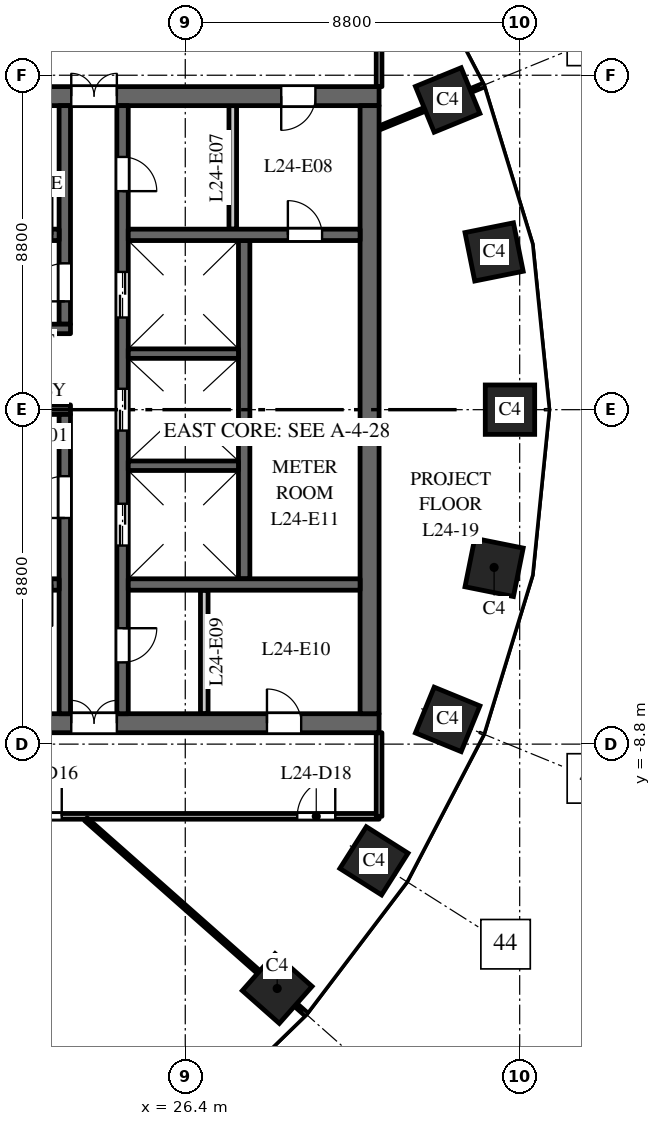
"""IFC4 building model, lengths in metres.
Left out: names, types, materials, properties, quantities, classifications, styles, units other than length and angle.
Written with IfcOpenShell. Run it as: python <this file> out.ifc"""

import sys

from ifc_helpers import new_model, si_unit, direction, frame, frame_2d, origin, origin_2d, place, context, subcontext, project, spatial, rectangle, extrude, element, fill, save


model = new_model("IFC4")
c1 = context("Model", 3, precision=1e-05, world=origin(), true_north=direction((0.0, 1.0)))
c2 = subcontext(c1, "Body", "Model", "MODEL_VIEW")
j1 = project(units=[si_unit("LENGTHUNIT", "METRE"), si_unit("PLANEANGLEUNIT", "RADIAN")], contexts=[c1])
p1 = place(None, origin())
s1 = spatial("IfcSite", under=j1, at=p1, CompositionType="ELEMENT")
p2 = place(p1, origin())
s2 = spatial("IfcBuilding", under=s1, at=p2, CompositionType="ELEMENT")
p3 = place(p2, frame((0.0, 0.0, 108.0)))
s3 = spatial("IfcBuildingStorey", under=s2, at=p3, CompositionType="ELEMENT", Elevation=108.0)
for number, where, z_axis, x_axis in (
    (1, (34.945, 0.0, 0.0), (0.0, 0.0, 1.0), (0.0, 1.0, 0.0)),
    (2, (34.527, 4.151, 0.0), (0.0, 0.0, 1.0), (-0.197, 0.98, 0.0)),
    (3, (33.305, 8.149, 0.0), (0.0, 0.0, 1.0), (-0.379, 0.925, 0.0)),
    (4, (28.819, -15.23, 0.0), (0.0, 0.0, 1.0), (0.663, 0.749, 0.0)),
    (5, (31.365, -11.871, 0.0), (0.0, 0.0, 1.0), (0.535, 0.845, 0.0)),
    (6, (33.305, -8.149, 0.0), (0.0, 0.0, 1.0), (0.379, 0.925, 0.0)),
    (7, (34.527, -4.151, 0.0), (0.0, 0.0, 1.0), (0.197, 0.98, 0.0)),
):
    element("IfcColumn", number, at=place(p3, frame(where, z_axis=z_axis, x_axis=x_axis)), inside=s3, PredefinedType="COLUMN", context=c2, shape_type="SweptSolid", body=[
        extrude(rectangle(XDim=1.3, YDim=1.3, at=origin_2d()), origin(), (0.0, 0.0, 1.0), 4.0),
    ])
p4 = place(p3, frame((16.5, 8.25, 0.0), z_axis=(0.0, 0.0, 1.0), x_axis=(1.0, 0.0, 0.0)))
e8 = element("IfcWall", 8, at=p4, inside=s3, PredefinedType="SHEAR", context=c2, shape_type="SweptSolid", body=[
    extrude(rectangle(XDim=15.0, YDim=0.5, at=frame_2d((7.5, 0.0))), origin(), (0.0, 0.0, 1.0), 3.7),
])
p5 = place(p4, frame((6.9, 0.0, 0.0)))
e9 = element("IfcOpeningElement", 9, at=p5, cuts=e8, PredefinedType="OPENING", context=c2, shape_type="SweptSolid", body=[
    extrude(rectangle(XDim=1.2, YDim=2.1, at=frame_2d((0.6, 1.05))), frame((0.0, 0.26, 0.0), z_axis=(0.0, -1.0, 0.0), x_axis=(1.0, 0.0, 0.0)), (0.0, 0.0, 1.0), 0.52),
])
p6 = place(p4, frame((12.425, 0.0, 0.0)))
e10 = element("IfcOpeningElement", 10, at=p6, cuts=e8, PredefinedType="OPENING", context=c2, shape_type="SweptSolid", body=[
    extrude(rectangle(XDim=0.9, YDim=2.1, at=frame_2d((0.45, 1.05))), frame((0.0, 0.26, 0.0), z_axis=(0.0, -1.0, 0.0), x_axis=(1.0, 0.0, 0.0)), (0.0, 0.0, 1.0), 0.52),
])
p7 = place(p3, frame((16.5, -8.25, 0.0), z_axis=(0.0, 0.0, 1.0), x_axis=(1.0, 0.0, 0.0)))
e11 = element("IfcWall", 11, at=p7, inside=s3, PredefinedType="SHEAR", context=c2, shape_type="SweptSolid", body=[
    extrude(rectangle(XDim=15.0, YDim=0.5, at=frame_2d((7.5, 0.0))), origin(), (0.0, 0.0, 1.0), 3.7),
])
p8 = place(p7, frame((6.9, 0.0, 0.0)))
e12 = element("IfcOpeningElement", 12, at=p8, cuts=e11, PredefinedType="OPENING", context=c2, shape_type="SweptSolid", body=[
    extrude(rectangle(XDim=1.2, YDim=2.1, at=frame_2d((0.6, 1.05))), frame((0.0, 0.26, 0.0), z_axis=(0.0, -1.0, 0.0), x_axis=(1.0, 0.0, 0.0)), (0.0, 0.0, 1.0), 0.52),
])
p9 = place(p7, frame((12.05, 0.0, 0.0)))
e13 = element("IfcOpeningElement", 13, at=p9, cuts=e11, PredefinedType="OPENING", context=c2, shape_type="SweptSolid", body=[
    extrude(rectangle(XDim=0.9, YDim=2.1, at=frame_2d((0.45, 1.05))), frame((0.0, 0.26, 0.0), z_axis=(0.0, -1.0, 0.0), x_axis=(1.0, 0.0, 0.0)), (0.0, 0.0, 1.0), 0.52),
])
p10 = place(p3, frame((27.95, -4.45, 0.0), z_axis=(0.0, 0.0, 1.0), x_axis=(0.0, 1.0, 0.0)))
e14 = element("IfcWall", 14, at=p10, inside=s3, PredefinedType="SHEAR", context=c2, shape_type="SweptSolid", body=[
    extrude(rectangle(XDim=8.9, YDim=0.3, at=frame_2d((4.45, 0.0))), origin(), (0.0, 0.0, 1.0), 3.7),
])
p11 = place(p3, frame((24.75, -8.0, 0.0), z_axis=(0.0, 0.0, 1.0), x_axis=(0.0, 1.0, 0.0)))
e15 = element("IfcWall", 15, at=p11, inside=s3, PredefinedType="SHEAR", context=c2, shape_type="SweptSolid", body=[
    extrude(rectangle(XDim=16.0, YDim=0.3, at=frame_2d((8.0, 0.0))), origin(), (0.0, 0.0, 1.0), 3.7),
])
p12 = place(p11, frame((4.425, 0.0, 0.0)))
e16 = element("IfcOpeningElement", 16, at=p12, cuts=e15, PredefinedType="OPENING", context=c2, shape_type="SweptSolid", body=[
    extrude(rectangle(XDim=1.1, YDim=2.1, at=frame_2d((0.55, 1.05))), frame((0.0, 0.16, 0.0), z_axis=(0.0, -1.0, 0.0), x_axis=(1.0, 0.0, 0.0)), (0.0, 0.0, 1.0), 0.32),
])
p13 = place(p11, frame((7.45, 0.0, 0.0)))
e17 = element("IfcOpeningElement", 17, at=p13, cuts=e15, PredefinedType="OPENING", context=c2, shape_type="SweptSolid", body=[
    extrude(rectangle(XDim=1.1, YDim=2.1, at=frame_2d((0.55, 1.05))), frame((0.0, 0.16, 0.0), z_axis=(0.0, -1.0, 0.0), x_axis=(1.0, 0.0, 0.0)), (0.0, 0.0, 1.0), 0.32),
])
p14 = place(p11, frame((10.425, 0.0, 0.0)))
e18 = element("IfcOpeningElement", 18, at=p14, cuts=e15, PredefinedType="OPENING", context=c2, shape_type="SweptSolid", body=[
    extrude(rectangle(XDim=1.2, YDim=2.1, at=frame_2d((0.6, 1.05))), frame((0.0, 0.16, 0.0), z_axis=(0.0, -1.0, 0.0), x_axis=(1.0, 0.0, 0.0)), (0.0, 0.0, 1.0), 0.32),
])
p15 = place(p11, frame((13.75, 0.0, 0.0)))
e19 = element("IfcOpeningElement", 19, at=p15, cuts=e15, PredefinedType="OPENING", context=c2, shape_type="SweptSolid", body=[
    extrude(rectangle(XDim=0.9, YDim=2.1, at=frame_2d((0.45, 1.05))), frame((0.0, 0.16, 0.0), z_axis=(0.0, -1.0, 0.0), x_axis=(1.0, 0.0, 0.0)), (0.0, 0.0, 1.0), 0.32),
])
p16 = place(p11, frame((1.35, 0.0, 0.0)))
e20 = element("IfcOpeningElement", 20, at=p16, cuts=e15, PredefinedType="OPENING", context=c2, shape_type="SweptSolid", body=[
    extrude(rectangle(XDim=0.9, YDim=2.1, at=frame_2d((0.45, 1.05))), frame((0.0, 0.16, 0.0), z_axis=(0.0, -1.0, 0.0), x_axis=(1.0, 0.0, 0.0)), (0.0, 0.0, 1.0), 0.32),
])
p17 = place(p3, frame((20.1, 0.0, 0.0), z_axis=(0.0, 0.0, 1.0), x_axis=(1.0, 0.0, 0.0)))
e21 = element("IfcWall", 21, at=p17, inside=s3, PredefinedType="SHEAR", context=c2, shape_type="SweptSolid", body=[
    extrude(rectangle(XDim=3.28, YDim=0.25, at=frame_2d((1.64, 0.0))), origin(), (0.0, 0.0, 1.0), 3.7),
])
p18 = place(p3, frame((31.25, -8.0, 0.0), z_axis=(0.0, 0.0, 1.0), x_axis=(0.0, 1.0, 0.0)))
e22 = element("IfcWall", 22, at=p18, inside=s3, PredefinedType="SHEAR", context=c2, shape_type="SweptSolid", body=[
    extrude(rectangle(XDim=16.0, YDim=0.5, at=frame_2d((8.0, 0.0))), origin(), (0.0, 0.0, 1.0), 3.7),
])
p19 = place(p3, frame((24.9, 4.6, 0.0), z_axis=(0.0, 0.0, 1.0), x_axis=(1.0, 0.0, 0.0)))
e23 = element("IfcWall", 23, at=p19, inside=s3, PredefinedType="SHEAR", context=c2, shape_type="SweptSolid", body=[
    extrude(rectangle(XDim=6.1, YDim=0.3, at=frame_2d((3.05, 0.0))), origin(), (0.0, 0.0, 1.0), 3.7),
])
p20 = place(p19, frame((4.2, 0.0, 0.0)))
e24 = element("IfcOpeningElement", 24, at=p20, cuts=e23, PredefinedType="OPENING", context=c2, shape_type="SweptSolid", body=[
    extrude(rectangle(XDim=0.9, YDim=2.1, at=frame_2d((0.45, 1.05))), frame((0.0, 0.16, 0.0), z_axis=(0.0, -1.0, 0.0), x_axis=(1.0, 0.0, 0.0)), (0.0, 0.0, 1.0), 0.32),
])
for number, where, z_axis, x_axis in (
    (25, (27.65, 4.75, 0.0), (0.0, 0.0, 1.0), (0.0, 1.0, 0.0)),
    (26, (26.9, -8.0, 0.0), (0.0, 0.0, 1.0), (0.0, 1.0, 0.0)),
):
    element("IfcWall", number, at=place(p3, frame(where, z_axis=z_axis, x_axis=x_axis)), inside=s3, PredefinedType="PARTITIONING", context=c2, shape_type="SweptSolid", body=[
        extrude(rectangle(XDim=3.25, YDim=0.2, at=frame_2d((1.625, 0.0))), origin(), (0.0, 0.0, 1.0), 3.7),
    ])
p21 = place(p3, frame((24.9, -4.6, 0.0), z_axis=(0.0, 0.0, 1.0), x_axis=(1.0, 0.0, 0.0)))
e27 = element("IfcWall", 27, at=p21, inside=s3, PredefinedType="SHEAR", context=c2, shape_type="SweptSolid", body=[
    extrude(rectangle(XDim=6.1, YDim=0.3, at=frame_2d((3.05, 0.0))), origin(), (0.0, 0.0, 1.0), 3.7),
])
for number, where, z_axis, x_axis in (
    (28, (24.9, -1.475, 0.0), (0.0, 0.0, 1.0), (1.0, 0.0, 0.0)),
    (29, (24.9, 1.475, 0.0), (0.0, 0.0, 1.0), (1.0, 0.0, 0.0)),
):
    element("IfcWall", number, at=place(p3, frame(where, z_axis=z_axis, x_axis=x_axis)), inside=s3, PredefinedType="SHEAR", context=c2, shape_type="SweptSolid", body=[
        extrude(rectangle(XDim=2.9, YDim=0.25, at=frame_2d((1.45, 0.0))), origin(), (0.0, 0.0, 1.0), 3.7),
    ])
p22 = place(p3, frame((23.23, 2.25, 0.0), z_axis=(0.0, 0.0, 1.0), x_axis=(0.0, 1.0, 0.0)))
e30 = element("IfcWall", 30, at=p22, inside=s3, PredefinedType="SHEAR", context=c2, shape_type="SweptSolid", body=[
    extrude(rectangle(XDim=5.75, YDim=0.3, at=frame_2d((2.875, 0.0))), origin(), (0.0, 0.0, 1.0), 3.7),
])
p23 = place(p22, frame((0.6, 0.0, 0.0)))
e31 = element("IfcOpeningElement", 31, at=p23, cuts=e30, PredefinedType="OPENING", context=c2, shape_type="SweptSolid", body=[
    extrude(rectangle(XDim=1.0, YDim=2.1, at=frame_2d((0.5, 1.05))), frame((0.0, 0.16, 0.0), z_axis=(0.0, -1.0, 0.0), x_axis=(1.0, 0.0, 0.0)), (0.0, 0.0, 1.0), 0.32),
])
p24 = place(p3, frame((23.23, -8.0, 0.0), z_axis=(0.0, 0.0, 1.0), x_axis=(0.0, 1.0, 0.0)))
e32 = element("IfcWall", 32, at=p24, inside=s3, PredefinedType="SHEAR", context=c2, shape_type="SweptSolid", body=[
    extrude(rectangle(XDim=7.875, YDim=0.3, at=frame_2d((3.938, 0.0))), origin(), (0.0, 0.0, 1.0), 3.7),
])
p25 = place(p24, frame((5.15, 0.0, 0.0)))
e33 = element("IfcOpeningElement", 33, at=p25, cuts=e32, PredefinedType="OPENING", context=c2, shape_type="SweptSolid", body=[
    extrude(rectangle(XDim=1.1, YDim=2.1, at=frame_2d((0.55, 1.05))), frame((0.0, 0.16, 0.0), z_axis=(0.0, -1.0, 0.0), x_axis=(1.0, 0.0, 0.0)), (0.0, 0.0, 1.0), 0.32),
])
p26 = place(p3, frame((16.9, 4.6, 0.0), z_axis=(0.0, 0.0, 1.0), x_axis=(1.0, 0.0, 0.0)))
e34 = element("IfcWall", 34, at=p26, inside=s3, PredefinedType="SHEAR", context=c2, shape_type="SweptSolid", body=[
    extrude(rectangle(XDim=6.18, YDim=0.3, at=frame_2d((3.09, 0.0))), origin(), (0.0, 0.0, 1.0), 3.7),
])
p27 = place(p26, frame((4.9, 0.0, 0.0)))
e35 = element("IfcOpeningElement", 35, at=p27, cuts=e34, PredefinedType="OPENING", context=c2, shape_type="SweptSolid", body=[
    extrude(rectangle(XDim=1.1, YDim=2.1, at=frame_2d((0.55, 1.05))), frame((0.0, 0.16, 0.0), z_axis=(0.0, -1.0, 0.0), x_axis=(1.0, 0.0, 0.0)), (0.0, 0.0, 1.0), 0.32),
])
p28 = place(p3, frame((16.9, -4.6, 0.0), z_axis=(0.0, 0.0, 1.0), x_axis=(1.0, 0.0, 0.0)))
e36 = element("IfcWall", 36, at=p28, inside=s3, PredefinedType="SHEAR", context=c2, shape_type="SweptSolid", body=[
    extrude(rectangle(XDim=6.18, YDim=0.3, at=frame_2d((3.09, 0.0))), origin(), (0.0, 0.0, 1.0), 3.7),
])
p29 = place(p28, frame((4.9, 0.0, 0.0)))
e37 = element("IfcOpeningElement", 37, at=p29, cuts=e36, PredefinedType="OPENING", context=c2, shape_type="SweptSolid", body=[
    extrude(rectangle(XDim=1.1, YDim=2.1, at=frame_2d((0.55, 1.05))), frame((0.0, 0.16, 0.0), z_axis=(0.0, -1.0, 0.0), x_axis=(1.0, 0.0, 0.0)), (0.0, 0.0, 1.0), 0.32),
])
p30 = place(p3, frame((20.85, 2.125, 0.0), z_axis=(0.0, 0.0, 1.0), x_axis=(1.0, 0.0, 0.0)))
e38 = element("IfcWall", 38, at=p30, inside=s3, PredefinedType="SHEAR", context=c2, shape_type="SweptSolid", body=[
    extrude(rectangle(XDim=2.53, YDim=0.25, at=frame_2d((1.265, 0.0))), origin(), (0.0, 0.0, 1.0), 3.7),
])
p31 = place(p3, frame((16.5, -10.7, 0.0), z_axis=(0.0, 0.0, 1.0), x_axis=(1.0, 0.0, 0.0)))
e39 = element("IfcWall", 39, at=p31, inside=s3, PredefinedType="PARTITIONING", context=c2, shape_type="SweptSolid", body=[
    extrude(rectangle(XDim=15.0, YDim=0.15, at=frame_2d((7.5, 0.0))), origin(), (0.0, 0.0, 1.0), 2.75),
])
p32 = place(p31, frame((5.65, 0.0, 0.0)))
e40 = element("IfcOpeningElement", 40, at=p32, cuts=e39, PredefinedType="OPENING", context=c2, shape_type="SweptSolid", body=[
    extrude(rectangle(XDim=1.0, YDim=2.1, at=frame_2d((0.5, 1.05))), frame((0.0, 0.085, 0.0), z_axis=(0.0, -1.0, 0.0), x_axis=(1.0, 0.0, 0.0)), (0.0, 0.0, 1.0), 0.17),
])
p33 = place(p31, frame((12.847, 0.0, 0.0)))
e41 = element("IfcOpeningElement", 41, at=p33, cuts=e39, PredefinedType="OPENING", context=c2, shape_type="SweptSolid", body=[
    extrude(rectangle(XDim=1.0, YDim=2.1, at=frame_2d((0.5, 1.05))), frame((0.0, 0.085, 0.0), z_axis=(0.0, -1.0, 0.0), x_axis=(1.0, 0.0, 0.0)), (0.0, 0.0, 1.0), 0.17),
])
p34 = place(p3, frame((23.785, -10.778, 0.0), z_axis=(0.0, 0.0, 1.0), x_axis=(0.748985701008, -0.662586160198, 0.0)))
e42 = element("IfcWall", 42, at=p34, inside=s3, PredefinedType="PARTITIONING", context=c2, shape_type="SweptSolid", body=[
    extrude(rectangle(XDim=7.723, YDim=0.1, at=frame_2d((3.861, 0.0))), origin(), (0.0, 0.0, 1.0), 3.7),
])
p35 = place(p3, frame((31.5, -10.7, 0.0), z_axis=(0.0, 0.0, 1.0), x_axis=(0.0, 1.0, 0.0)))
e43 = element("IfcWall", 43, at=p35, inside=s3, PredefinedType="PARTITIONING", context=c2, shape_type="SweptSolid", body=[
    extrude(rectangle(XDim=2.2, YDim=0.15, at=frame_2d((1.1, 0.0))), origin(), (0.0, 0.0, 1.0), 2.9),
])
p36 = place(p3, frame((31.5, 7.41, 0.0), z_axis=(0.0, 0.0, 1.0), x_axis=(0.925344112436, 0.379128307542, 0.0)))
e44 = element("IfcWall", 44, at=p36, inside=s3, PredefinedType="PARTITIONING", context=c2, shape_type="SweptSolid", body=[
    extrude(rectangle(XDim=2.954, YDim=0.1, at=frame_2d((1.477, 0.0))), origin(), (0.0, 0.0, 1.0), 3.7),
])
p37 = place(p3, frame((31.5, 8.5, 0.0), z_axis=(0.0, 0.0, 1.0), x_axis=(0.0, 1.0, 0.0)))
e45 = element("IfcWall", 45, at=p37, inside=s3, PredefinedType="PARTITIONING", context=c2, shape_type="SweptSolid", body=[
    extrude(rectangle(XDim=2.2, YDim=0.15, at=frame_2d((1.1, 0.0))), origin(), (0.0, 0.0, 1.0), 2.9),
])
p38 = place(p12, origin())
e46 = element("IfcDoor", 46, at=p38, inside=s3, OperationType="DOUBLE_DOOR_SLIDING", PredefinedType="DOOR", context=c2, shape_type="SweptSolid", body=[
    extrude(rectangle(XDim=1.1, YDim=2.1, at=frame_2d((0.55, 1.05))), frame((0.0, 0.025, 0.0), z_axis=(0.0, -1.0, 0.0), x_axis=(1.0, 0.0, 0.0)), (0.0, 0.0, 1.0), 0.05),
])
fill(e16, e46)
p39 = place(p13, origin())
e47 = element("IfcDoor", 47, at=p39, inside=s3, OperationType="DOUBLE_DOOR_SLIDING", PredefinedType="DOOR", context=c2, shape_type="SweptSolid", body=[
    extrude(rectangle(XDim=1.1, YDim=2.1, at=frame_2d((0.55, 1.05))), frame((0.0, 0.025, 0.0), z_axis=(0.0, -1.0, 0.0), x_axis=(1.0, 0.0, 0.0)), (0.0, 0.0, 1.0), 0.05),
])
fill(e17, e47)
p40 = place(p14, origin())
e48 = element("IfcDoor", 48, at=p40, inside=s3, OperationType="DOUBLE_DOOR_SLIDING", PredefinedType="DOOR", context=c2, shape_type="SweptSolid", body=[
    extrude(rectangle(XDim=1.2, YDim=2.1, at=frame_2d((0.6, 1.05))), frame((0.0, 0.025, 0.0), z_axis=(0.0, -1.0, 0.0), x_axis=(1.0, 0.0, 0.0)), (0.0, 0.0, 1.0), 0.05),
])
fill(e18, e48)
p41 = place(p27, origin())
e49 = element("IfcDoor", 49, at=p41, inside=s3, OperationType="SINGLE_SWING_LEFT", PredefinedType="DOOR", context=c2, shape_type="SweptSolid", body=[
    extrude(rectangle(XDim=1.1, YDim=2.1, at=frame_2d((0.55, 1.05))), frame((0.0, 0.025, 0.0), z_axis=(0.0, -1.0, 0.0), x_axis=(1.0, 0.0, 0.0)), (0.0, 0.0, 1.0), 0.05),
])
fill(e35, e49)
p42 = place(p29, origin())
e50 = element("IfcDoor", 50, at=p42, inside=s3, OperationType="SINGLE_SWING_RIGHT", PredefinedType="DOOR", context=c2, shape_type="SweptSolid", body=[
    extrude(rectangle(XDim=1.1, YDim=2.1, at=frame_2d((0.55, 1.05))), frame((0.0, 0.025, 0.0), z_axis=(0.0, -1.0, 0.0), x_axis=(1.0, 0.0, 0.0)), (0.0, 0.0, 1.0), 0.05),
])
fill(e37, e50)
p43 = place(p25, origin())
e51 = element("IfcDoor", 51, at=p43, inside=s3, OperationType="SINGLE_SWING_RIGHT", PredefinedType="DOOR", context=c2, shape_type="SweptSolid", body=[
    extrude(rectangle(XDim=1.1, YDim=2.1, at=frame_2d((0.55, 1.05))), frame((0.0, 0.025, 0.0), z_axis=(0.0, -1.0, 0.0), x_axis=(1.0, 0.0, 0.0)), (0.0, 0.0, 1.0), 0.05),
])
fill(e33, e51)
p44 = place(p23, origin())
e52 = element("IfcDoor", 52, at=p44, inside=s3, OperationType="SINGLE_SWING_RIGHT", PredefinedType="DOOR", context=c2, shape_type="SweptSolid", body=[
    extrude(rectangle(XDim=1.0, YDim=2.1, at=frame_2d((0.5, 1.05))), frame((0.0, 0.025, 0.0), z_axis=(0.0, -1.0, 0.0), x_axis=(1.0, 0.0, 0.0)), (0.0, 0.0, 1.0), 0.05),
])
fill(e31, e52)
p45 = place(p5, origin())
e53 = element("IfcDoor", 53, at=p45, inside=s3, OperationType="DOUBLE_DOOR_DOUBLE_SWING", PredefinedType="DOOR", context=c2, shape_type="SweptSolid", body=[
    extrude(rectangle(XDim=1.2, YDim=2.1, at=frame_2d((0.6, 1.05))), frame((0.0, 0.025, 0.0), z_axis=(0.0, -1.0, 0.0), x_axis=(1.0, 0.0, 0.0)), (0.0, 0.0, 1.0), 0.05),
])
fill(e9, e53)
p46 = place(p8, origin())
e54 = element("IfcDoor", 54, at=p46, inside=s3, OperationType="DOUBLE_DOOR_DOUBLE_SWING", PredefinedType="DOOR", context=c2, shape_type="SweptSolid", body=[
    extrude(rectangle(XDim=1.2, YDim=2.1, at=frame_2d((0.6, 1.05))), frame((0.0, 0.025, 0.0), z_axis=(0.0, -1.0, 0.0), x_axis=(1.0, 0.0, 0.0)), (0.0, 0.0, 1.0), 0.05),
])
fill(e12, e54)
p47 = place(p15, origin())
e55 = element("IfcDoor", 55, at=p47, inside=s3, OperationType="SINGLE_SWING_LEFT", PredefinedType="DOOR", context=c2, shape_type="SweptSolid", body=[
    extrude(rectangle(XDim=0.9, YDim=2.1, at=frame_2d((0.45, 1.05))), frame((0.0, 0.025, 0.0), z_axis=(0.0, -1.0, 0.0), x_axis=(1.0, 0.0, 0.0)), (0.0, 0.0, 1.0), 0.05),
])
fill(e19, e55)
p48 = place(p6, origin())
e56 = element("IfcDoor", 56, at=p48, inside=s3, OperationType="SINGLE_SWING_LEFT", PredefinedType="DOOR", context=c2, shape_type="SweptSolid", body=[
    extrude(rectangle(XDim=0.9, YDim=2.1, at=frame_2d((0.45, 1.05))), frame((0.0, 0.025, 0.0), z_axis=(0.0, -1.0, 0.0), x_axis=(1.0, 0.0, 0.0)), (0.0, 0.0, 1.0), 0.05),
])
fill(e10, e56)
p49 = place(p16, origin())
e57 = element("IfcDoor", 57, at=p49, inside=s3, OperationType="SINGLE_SWING_RIGHT", PredefinedType="DOOR", context=c2, shape_type="SweptSolid", body=[
    extrude(rectangle(XDim=0.9, YDim=2.1, at=frame_2d((0.45, 1.05))), frame((0.0, 0.025, 0.0), z_axis=(0.0, -1.0, 0.0), x_axis=(1.0, 0.0, 0.0)), (0.0, 0.0, 1.0), 0.05),
])
fill(e20, e57)
p50 = place(p9, origin())
e58 = element("IfcDoor", 58, at=p50, inside=s3, OperationType="SINGLE_SWING_RIGHT", PredefinedType="DOOR", context=c2, shape_type="SweptSolid", body=[
    extrude(rectangle(XDim=0.9, YDim=2.1, at=frame_2d((0.45, 1.05))), frame((0.0, 0.025, 0.0), z_axis=(0.0, -1.0, 0.0), x_axis=(1.0, 0.0, 0.0)), (0.0, 0.0, 1.0), 0.05),
])
fill(e13, e58)
p51 = place(p20, origin())
e59 = element("IfcDoor", 59, at=p51, inside=s3, OperationType="SINGLE_SWING_RIGHT", PredefinedType="DOOR", context=c2, shape_type="SweptSolid", body=[
    extrude(rectangle(XDim=0.9, YDim=2.1, at=frame_2d((0.45, 1.05))), frame((0.0, 0.025, 0.0), z_axis=(0.0, -1.0, 0.0), x_axis=(1.0, 0.0, 0.0)), (0.0, 0.0, 1.0), 0.05),
])
fill(e24, e59)
p52 = place(p32, origin())
e60 = element("IfcDoor", 60, at=p52, inside=s3, OperationType="SINGLE_SWING_RIGHT", PredefinedType="DOOR", context=c2, shape_type="SweptSolid", body=[
    extrude(rectangle(XDim=1.0, YDim=2.1, at=frame_2d((0.5, 1.05))), frame((0.0, 0.025, 0.0), z_axis=(0.0, -1.0, 0.0), x_axis=(1.0, 0.0, 0.0)), (0.0, 0.0, 1.0), 0.05),
])
fill(e40, e60)
p53 = place(p33, origin())
e61 = element("IfcDoor", 61, at=p53, inside=s3, OperationType="SINGLE_SWING_RIGHT", PredefinedType="DOOR", context=c2, shape_type="SweptSolid", body=[
    extrude(rectangle(XDim=1.0, YDim=2.1, at=frame_2d((0.5, 1.05))), frame((0.0, 0.025, 0.0), z_axis=(0.0, -1.0, 0.0), x_axis=(1.0, 0.0, 0.0)), (0.0, 0.0, 1.0), 0.05),
])
fill(e41, e61)
save(model, sys.argv[1])
